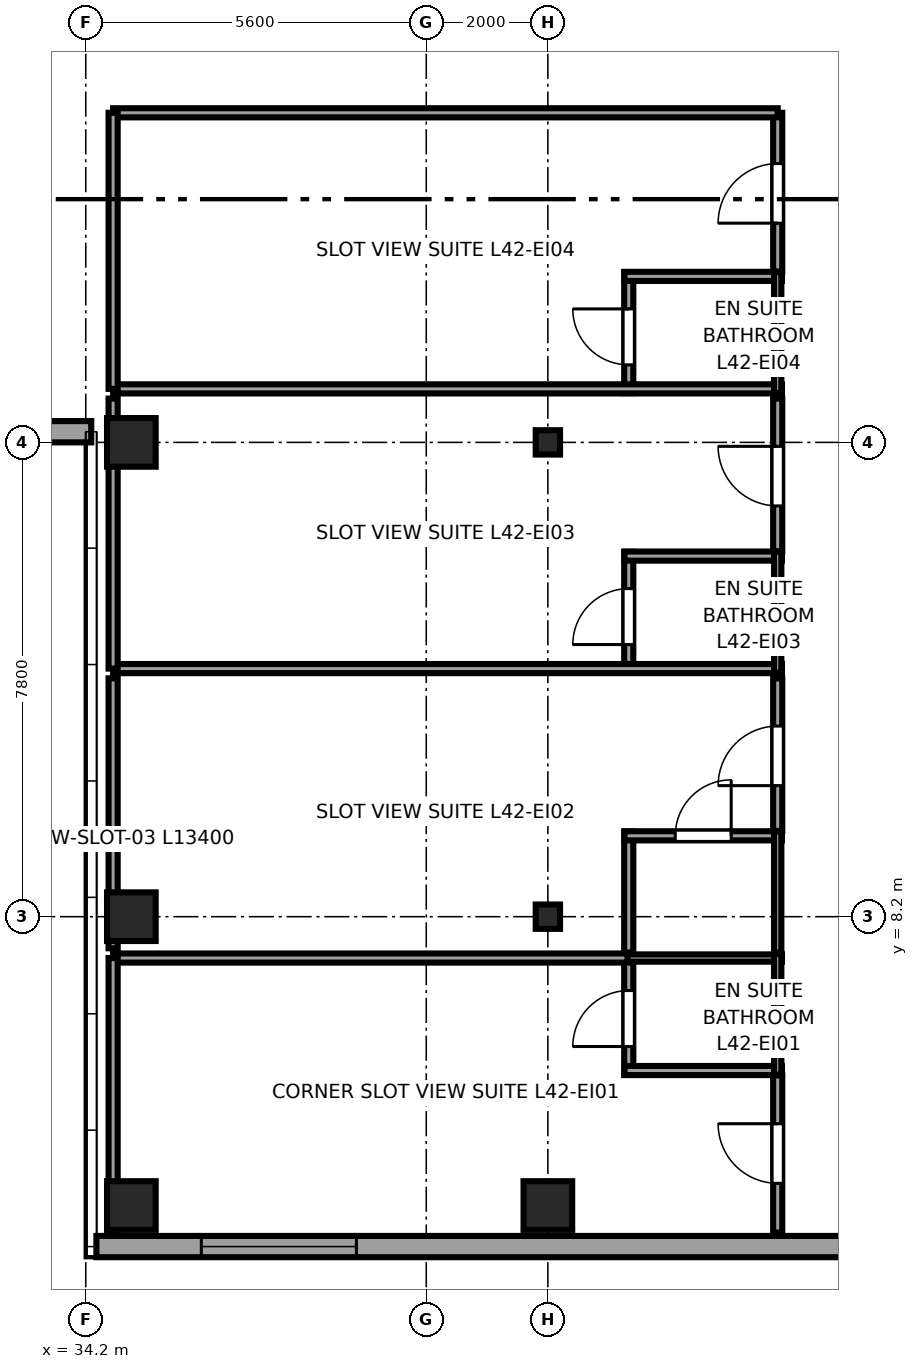
"""IFC4 building model, lengths in metres.
Left out: names, types, materials, properties, quantities, classifications, styles, units other than length and angle.
Written with IfcOpenShell. Run it as: python <this file> out.ifc"""

import sys

from ifc_helpers import new_model, si_unit, direction, frame, frame_2d, origin, origin_2d, place, context, subcontext, project, spatial, rectangle, i_section, extrude, source, transform, mapped, element, fill, save


model = new_model("IFC4")
c1 = context("Model", 3, precision=1e-05, world=origin(), true_north=direction((0.0, 1.0)))
c2 = subcontext(c1, "Body", "Model", "MODEL_VIEW")
j1 = project(units=[si_unit("LENGTHUNIT", "METRE"), si_unit("PLANEANGLEUNIT", "RADIAN")], contexts=[c1])
p1 = place(None, origin())
s1 = spatial("IfcSite", under=j1, at=p1, CompositionType="ELEMENT")
p2 = place(p1, origin())
s2 = spatial("IfcBuilding", under=s1, at=p2, CompositionType="ELEMENT")
p3 = place(p2, frame((0.0, 0.0, 161.25)))
s3 = spatial("IfcBuildingStorey", under=s2, at=p3, CompositionType="ELEMENT", Elevation=161.25)
m1 = source(origin(), c2, "Body", "SweptSolid", [
    extrude(rectangle(XDim=0.8, YDim=0.8, at=origin_2d()), origin(), (0.0, 0.0, 1.0), 3.55),
])
for number, where, z_axis, x_axis in (
    (1, (34.95, 3.45, 0.0), (0.0, 0.0, 1.0), (1.0, 0.0, 0.0)),
    (2, (34.95, 8.2, 0.0), (0.0, 0.0, 1.0), (1.0, 0.0, 0.0)),
    (3, (34.95, 16.0, 0.0), (0.0, 0.0, 1.0), (1.0, 0.0, 0.0)),
    (4, (41.8, 3.45, 0.0), (0.0, 0.0, 1.0), (1.0, 0.0, 0.0)),
):
    element("IfcColumn", number, at=place(p3, frame(where, z_axis=z_axis, x_axis=x_axis)), inside=s3, PredefinedType="COLUMN", context=c2, shape_type="MappedRepresentation", body=[
        mapped(m1, transform((0.0, 0.0, 0.0), x_axis=(1.0, 0.0, 0.0), y_axis=(0.0, 1.0, 0.0), z_axis=(0.0, 0.0, 1.0), scale=1.0)),
    ])
m2 = source(origin(), c2, "Body", "SweptSolid", [
    extrude(i_section(OverallWidth=0.4, OverallDepth=0.4, WebThickness=0.02, FlangeThickness=0.035, at=origin_2d()), origin(), (0.0, 0.0, 1.0), 3.55),
])
for number, where, z_axis, x_axis in (
    (5, (41.8, 8.2, 0.0), (0.0, 0.0, 1.0), (1.0, 0.0, 0.0)),
    (6, (41.8, 16.0, 0.0), (0.0, 0.0, 1.0), (1.0, 0.0, 0.0)),
):
    element("IfcColumn", number, at=place(p3, frame(where, z_axis=z_axis, x_axis=x_axis)), inside=s3, PredefinedType="COLUMN", context=c2, shape_type="MappedRepresentation", body=[
        mapped(m2, transform((0.0, 0.0, 0.0), x_axis=(1.0, 0.0, 0.0), y_axis=(0.0, 1.0, 0.0), z_axis=(0.0, 0.0, 1.0), scale=1.0)),
    ])
p4 = place(p3, frame((22.71, 16.175, 0.0), z_axis=(0.0, 0.0, 1.0), x_axis=(1.0, 0.0, 0.0)))
e7 = element("IfcWall", 7, at=p4, inside=s3, PredefinedType="SOLIDWALL", context=c2, shape_type="SweptSolid", body=[
    extrude(rectangle(XDim=11.58, YDim=0.35, at=frame_2d((5.79, 0.0))), origin(), (0.0, 0.0, 1.0), 2.758),
])
p5 = place(p4, frame((1.92, 0.0, 0.68)))
e8 = element("IfcOpeningElement", 8, at=p5, cuts=e7, PredefinedType="OPENING", context=c2, shape_type="SweptSolid", body=[
    extrude(rectangle(XDim=2.55, YDim=1.92, at=frame_2d((1.275, 0.96))), frame((0.0, 0.185, 0.0), z_axis=(0.0, -1.0, 0.0), x_axis=(1.0, 0.0, 0.0)), (0.0, 0.0, 1.0), 0.37),
])
p6 = place(p4, frame((7.11, 0.0, 0.68)))
e9 = element("IfcOpeningElement", 9, at=p6, cuts=e7, PredefinedType="OPENING", context=c2, shape_type="SweptSolid", body=[
    extrude(rectangle(XDim=2.55, YDim=1.92, at=frame_2d((1.275, 0.96))), frame((0.0, 0.185, 0.0), z_axis=(0.0, -1.0, 0.0), x_axis=(1.0, 0.0, 0.0)), (0.0, 0.0, 1.0), 0.37),
])
p7 = place(p3, frame((34.375, 2.775, 0.0), z_axis=(0.0, 0.0, 1.0), x_axis=(1.0, 0.0, 0.0)))
e10 = element("IfcWall", 10, at=p7, inside=s3, PredefinedType="SOLIDWALL", context=c2, shape_type="SweptSolid", body=[
    extrude(rectangle(XDim=15.608, YDim=0.35, at=frame_2d((7.804, 0.0))), origin(), (0.0, 0.0, 1.0), 3.37),
])
p8 = place(p7, frame((1.726, 0.0, 0.68)))
e11 = element("IfcOpeningElement", 11, at=p8, cuts=e10, PredefinedType="OPENING", context=c2, shape_type="SweptSolid", body=[
    extrude(rectangle(XDim=2.55, YDim=1.92, at=frame_2d((1.275, 0.96))), frame((0.0, 0.185, 0.0), z_axis=(0.0, -1.0, 0.0), x_axis=(1.0, 0.0, 0.0)), (0.0, 0.0, 1.0), 0.37),
])
p9 = place(p7, frame((13.616, 0.0, 0.62)))
e12 = element("IfcOpeningElement", 12, at=p9, cuts=e10, PredefinedType="OPENING", context=c2, shape_type="SweptSolid", body=[
    extrude(rectangle(XDim=1.5, YDim=1.55, at=frame_2d((0.75, 0.775))), frame((0.0, 0.185, 0.0), z_axis=(0.0, -1.0, 0.0), x_axis=(1.0, 0.0, 0.0)), (0.0, 0.0, 1.0), 0.37),
])
p10 = place(p3, frame((43.13, 5.6, 0.0), z_axis=(0.0, 0.0, 1.0), x_axis=(0.0, 1.0, 0.0)))
e13 = element("IfcWall", 13, at=p10, inside=s3, PredefinedType="PARTITIONING", context=c2, shape_type="SweptSolid", body=[
    extrude(rectangle(XDim=1.99, YDim=0.15, at=frame_2d((0.995, 0.0))), origin(), (0.0, 0.0, 1.0), 3.37),
])
p11 = place(p10, frame((0.465, 0.0, 0.0)))
e14 = element("IfcOpeningElement", 14, at=p11, cuts=e13, PredefinedType="OPENING", context=c2, shape_type="SweptSolid", body=[
    extrude(rectangle(XDim=0.92, YDim=2.01, at=frame_2d((0.46, 1.005))), frame((0.0, 0.085, 0.0), z_axis=(0.0, -1.0, 0.0), x_axis=(1.0, 0.0, 0.0)), (0.0, 0.0, 1.0), 0.17),
])
p12 = place(p3, frame((43.06, 5.67, 0.0), z_axis=(0.0, 0.0, 1.0), x_axis=(1.0, 0.0, 0.0)))
e15 = element("IfcWall", 15, at=p12, inside=s3, PredefinedType="PARTITIONING", context=c2, shape_type="SweptSolid", body=[
    extrude(rectangle(XDim=2.59, YDim=0.15, at=frame_2d((1.295, 0.0))), origin(), (0.0, 0.0, 1.0), 3.37),
])
p13 = place(p3, frame((43.06, 7.52, 0.0), z_axis=(0.0, 0.0, 1.0), x_axis=(1.0, 0.0, 0.0)))
e16 = element("IfcWall", 16, at=p13, inside=s3, PredefinedType="PLUMBINGWALL", context=c2, shape_type="SweptSolid", body=[
    extrude(rectangle(XDim=2.59, YDim=0.12, at=frame_2d((1.295, 0.0))), origin(), (0.0, 0.0, 1.0), 3.37),
])
p14 = place(p3, frame((45.58, 5.6, 0.0), z_axis=(0.0, 0.0, 1.0), x_axis=(0.0, 1.0, 0.0)))
e17 = element("IfcWall", 17, at=p14, inside=s3, PredefinedType="PLUMBINGWALL", context=c2, shape_type="SweptSolid", body=[
    extrude(rectangle(XDim=1.99, YDim=0.12, at=frame_2d((0.995, 0.0))), origin(), (0.0, 0.0, 1.0), 3.37),
])
p15 = place(p3, frame((43.13, 7.61, 0.0), z_axis=(0.0, 0.0, 1.0), x_axis=(0.0, 1.0, 0.0)))
e18 = element("IfcWall", 18, at=p15, inside=s3, PredefinedType="PARTITIONING", context=c2, shape_type="SweptSolid", body=[
    extrude(rectangle(XDim=1.99, YDim=0.15, at=frame_2d((0.995, 0.0))), origin(), (0.0, 0.0, 1.0), 3.37),
])
p16 = place(p3, frame((43.06, 9.53, 0.0), z_axis=(0.0, 0.0, 1.0), x_axis=(1.0, 0.0, 0.0)))
e19 = element("IfcWall", 19, at=p16, inside=s3, PredefinedType="PARTITIONING", context=c2, shape_type="SweptSolid", body=[
    extrude(rectangle(XDim=2.59, YDim=0.15, at=frame_2d((1.295, 0.0))), origin(), (0.0, 0.0, 1.0), 3.37),
])
p17 = place(p16, frame((0.835, 0.0, 0.0)))
e20 = element("IfcOpeningElement", 20, at=p17, cuts=e19, PredefinedType="OPENING", context=c2, shape_type="SweptSolid", body=[
    extrude(rectangle(XDim=0.92, YDim=2.01, at=frame_2d((0.46, 1.005))), frame((0.0, 0.085, 0.0), z_axis=(0.0, -1.0, 0.0), x_axis=(1.0, 0.0, 0.0)), (0.0, 0.0, 1.0), 0.17),
])
p18 = place(p3, frame((45.58, 7.61, 0.0), z_axis=(0.0, 0.0, 1.0), x_axis=(0.0, 1.0, 0.0)))
e21 = element("IfcWall", 21, at=p18, inside=s3, PredefinedType="PLUMBINGWALL", context=c2, shape_type="SweptSolid", body=[
    extrude(rectangle(XDim=1.99, YDim=0.12, at=frame_2d((0.995, 0.0))), origin(), (0.0, 0.0, 1.0), 3.001),
])
p19 = place(p3, frame((43.13, 12.21, 0.0), z_axis=(0.0, 0.0, 1.0), x_axis=(0.0, 1.0, 0.0)))
e22 = element("IfcWall", 22, at=p19, inside=s3, PredefinedType="PARTITIONING", context=c2, shape_type="SweptSolid", body=[
    extrude(rectangle(XDim=1.99, YDim=0.15, at=frame_2d((0.995, 0.0))), origin(), (0.0, 0.0, 1.0), 3.37),
])
p20 = place(p19, frame((0.465, 0.0, 0.0)))
e23 = element("IfcOpeningElement", 23, at=p20, cuts=e22, PredefinedType="OPENING", context=c2, shape_type="SweptSolid", body=[
    extrude(rectangle(XDim=0.92, YDim=2.01, at=frame_2d((0.46, 1.005))), frame((0.0, 0.085, 0.0), z_axis=(0.0, -1.0, 0.0), x_axis=(1.0, 0.0, 0.0)), (0.0, 0.0, 1.0), 0.17),
])
p21 = place(p3, frame((34.65, 12.28, 0.0), z_axis=(0.0, 0.0, 1.0), x_axis=(1.0, 0.0, 0.0)))
e24 = element("IfcWall", 24, at=p21, inside=s3, PredefinedType="PARTITIONING", context=c2, shape_type="SweptSolid", body=[
    extrude(rectangle(XDim=11.0, YDim=0.15, at=frame_2d((5.5, 0.0))), origin(), (0.0, 0.0, 1.0), 3.37),
])
p22 = place(p3, frame((43.06, 14.13, 0.0), z_axis=(0.0, 0.0, 1.0), x_axis=(1.0, 0.0, 0.0)))
e25 = element("IfcWall", 25, at=p22, inside=s3, PredefinedType="PARTITIONING", context=c2, shape_type="SweptSolid", body=[
    extrude(rectangle(XDim=2.59, YDim=0.15, at=frame_2d((1.295, 0.0))), origin(), (0.0, 0.0, 1.0), 3.37),
])
p23 = place(p3, frame((45.58, 12.21, 0.0), z_axis=(0.0, 0.0, 1.0), x_axis=(0.0, 1.0, 0.0)))
e26 = element("IfcWall", 26, at=p23, inside=s3, PredefinedType="PLUMBINGWALL", context=c2, shape_type="SweptSolid", body=[
    extrude(rectangle(XDim=1.99, YDim=0.12, at=frame_2d((0.995, 0.0))), origin(), (0.0, 0.0, 1.0), 3.001),
])
p24 = place(p3, frame((43.13, 16.81, 0.0), z_axis=(0.0, 0.0, 1.0), x_axis=(0.0, 1.0, 0.0)))
e27 = element("IfcWall", 27, at=p24, inside=s3, PredefinedType="PARTITIONING", context=c2, shape_type="SweptSolid", body=[
    extrude(rectangle(XDim=1.99, YDim=0.15, at=frame_2d((0.995, 0.0))), origin(), (0.0, 0.0, 1.0), 3.37),
])
p25 = place(p24, frame((0.465, 0.0, 0.0)))
e28 = element("IfcOpeningElement", 28, at=p25, cuts=e27, PredefinedType="OPENING", context=c2, shape_type="SweptSolid", body=[
    extrude(rectangle(XDim=0.92, YDim=2.01, at=frame_2d((0.46, 1.005))), frame((0.0, 0.085, 0.0), z_axis=(0.0, -1.0, 0.0), x_axis=(1.0, 0.0, 0.0)), (0.0, 0.0, 1.0), 0.17),
])
p26 = place(p3, frame((34.65, 16.88, 0.0), z_axis=(0.0, 0.0, 1.0), x_axis=(1.0, 0.0, 0.0)))
e29 = element("IfcWall", 29, at=p26, inside=s3, PredefinedType="PARTITIONING", context=c2, shape_type="SweptSolid", body=[
    extrude(rectangle(XDim=11.0, YDim=0.15, at=frame_2d((5.5, 0.0))), origin(), (0.0, 0.0, 1.0), 3.37),
])
p27 = place(p3, frame((43.06, 18.73, 0.0), z_axis=(0.0, 0.0, 1.0), x_axis=(1.0, 0.0, 0.0)))
e30 = element("IfcWall", 30, at=p27, inside=s3, PredefinedType="PARTITIONING", context=c2, shape_type="SweptSolid", body=[
    extrude(rectangle(XDim=2.59, YDim=0.15, at=frame_2d((1.295, 0.0))), origin(), (0.0, 0.0, 1.0), 3.37),
])
p28 = place(p3, frame((45.58, 16.81, 0.0), z_axis=(0.0, 0.0, 1.0), x_axis=(0.0, 1.0, 0.0)))
e31 = element("IfcWall", 31, at=p28, inside=s3, PredefinedType="PLUMBINGWALL", context=c2, shape_type="SweptSolid", body=[
    extrude(rectangle(XDim=1.99, YDim=0.12, at=frame_2d((0.995, 0.0))), origin(), (0.0, 0.0, 1.0), 3.001),
])
p29 = place(p3, frame((45.58, 3.005, 0.0), z_axis=(0.0, 0.0, 1.0), x_axis=(0.0, 1.0, 0.0)))
e32 = element("IfcWall", 32, at=p29, inside=s3, PredefinedType="PARTITIONING", context=c2, shape_type="SweptSolid", body=[
    extrude(rectangle(XDim=2.585, YDim=0.15, at=frame_2d((1.292, 0.0))), origin(), (0.0, 0.0, 1.0), 3.37),
])
p30 = place(p29, frame((0.81, 0.0, 0.0)))
e33 = element("IfcOpeningElement", 33, at=p30, cuts=e32, PredefinedType="OPENING", context=c2, shape_type="SweptSolid", body=[
    extrude(rectangle(XDim=0.98, YDim=2.12, at=frame_2d((0.49, 1.06))), frame((0.0, 0.085, 0.0), z_axis=(0.0, -1.0, 0.0), x_axis=(1.0, 0.0, 0.0)), (0.0, 0.0, 1.0), 0.17),
])
p31 = place(p3, frame((34.65, 7.52, 0.0), z_axis=(0.0, 0.0, 1.0), x_axis=(1.0, 0.0, 0.0)))
e34 = element("IfcWall", 34, at=p31, inside=s3, PredefinedType="PARTITIONING", context=c2, shape_type="SweptSolid", body=[
    extrude(rectangle(XDim=8.46, YDim=0.15, at=frame_2d((4.23, 0.0))), origin(), (0.0, 0.0, 1.0), 3.37),
])
p32 = place(p3, frame((34.65, 3.005, 0.0), z_axis=(0.0, 0.0, 1.0), x_axis=(0.0, 1.0, 0.0)))
e35 = element("IfcWall", 35, at=p32, inside=s3, PredefinedType="PARTITIONING", context=c2, shape_type="SweptSolid", body=[
    extrude(rectangle(XDim=4.515, YDim=0.15, at=frame_2d((2.258, 0.0))), origin(), (0.0, 0.0, 1.0), 3.37),
])
p33 = place(p3, frame((45.58, 9.61, 0.0), z_axis=(0.0, 0.0, 1.0), x_axis=(0.0, 1.0, 0.0)))
e36 = element("IfcWall", 36, at=p33, inside=s3, PredefinedType="PARTITIONING", context=c2, shape_type="SweptSolid", body=[
    extrude(rectangle(XDim=2.51, YDim=0.15, at=frame_2d((1.255, 0.0))), origin(), (0.0, 0.0, 1.0), 3.001),
])
p34 = place(p33, frame((0.745, 0.0, 0.0)))
e37 = element("IfcOpeningElement", 37, at=p34, cuts=e36, PredefinedType="OPENING", context=c2, shape_type="SweptSolid", body=[
    extrude(rectangle(XDim=0.98, YDim=2.12, at=frame_2d((0.49, 1.06))), frame((0.0, 0.085, 0.0), z_axis=(0.0, -1.0, 0.0), x_axis=(1.0, 0.0, 0.0)), (0.0, 0.0, 1.0), 0.17),
])
p35 = place(p3, frame((34.65, 7.68, 0.0), z_axis=(0.0, 0.0, 1.0), x_axis=(0.0, 1.0, 0.0)))
e38 = element("IfcWall", 38, at=p35, inside=s3, PredefinedType="PARTITIONING", context=c2, shape_type="SweptSolid", body=[
    extrude(rectangle(XDim=4.44, YDim=0.15, at=frame_2d((2.22, 0.0))), origin(), (0.0, 0.0, 1.0), 3.37),
])
p36 = place(p3, frame((45.58, 14.21, 0.0), z_axis=(0.0, 0.0, 1.0), x_axis=(0.0, 1.0, 0.0)))
e39 = element("IfcWall", 39, at=p36, inside=s3, PredefinedType="PARTITIONING", context=c2, shape_type="SweptSolid", body=[
    extrude(rectangle(XDim=2.51, YDim=0.15, at=frame_2d((1.255, 0.0))), origin(), (0.0, 0.0, 1.0), 3.001),
])
p37 = place(p36, frame((0.745, 0.0, 0.0)))
e40 = element("IfcOpeningElement", 40, at=p37, cuts=e39, PredefinedType="OPENING", context=c2, shape_type="SweptSolid", body=[
    extrude(rectangle(XDim=0.98, YDim=2.12, at=frame_2d((0.49, 1.06))), frame((0.0, 0.085, 0.0), z_axis=(0.0, -1.0, 0.0), x_axis=(1.0, 0.0, 0.0)), (0.0, 0.0, 1.0), 0.17),
])
p38 = place(p3, frame((34.65, 12.28, 0.0), z_axis=(0.0, 0.0, 1.0), x_axis=(0.0, 1.0, 0.0)))
e41 = element("IfcWall", 41, at=p38, inside=s3, PredefinedType="PARTITIONING", context=c2, shape_type="SweptSolid", body=[
    extrude(rectangle(XDim=4.44, YDim=0.15, at=frame_2d((2.22, 0.0))), origin(), (0.0, 0.0, 1.0), 3.37),
])
p39 = place(p3, frame((45.58, 18.81, 0.0), z_axis=(0.0, 0.0, 1.0), x_axis=(0.0, 1.0, 0.0)))
e42 = element("IfcWall", 42, at=p39, inside=s3, PredefinedType="PARTITIONING", context=c2, shape_type="SweptSolid", body=[
    extrude(rectangle(XDim=2.61, YDim=0.15, at=frame_2d((1.305, 0.0))), origin(), (0.0, 0.0, 1.0), 3.001),
])
p40 = place(p39, frame((0.795, 0.0, 0.0)))
e43 = element("IfcOpeningElement", 43, at=p40, cuts=e42, PredefinedType="OPENING", context=c2, shape_type="SweptSolid", body=[
    extrude(rectangle(XDim=0.98, YDim=2.12, at=frame_2d((0.49, 1.06))), frame((0.0, 0.085, 0.0), z_axis=(0.0, -1.0, 0.0), x_axis=(1.0, 0.0, 0.0)), (0.0, 0.0, 1.0), 0.17),
])
p41 = place(p3, frame((34.65, 21.42, 0.0), z_axis=(0.0, 0.0, 1.0), x_axis=(1.0, 0.0, 0.0)))
e44 = element("IfcWall", 44, at=p41, inside=s3, PredefinedType="PARTITIONING", context=c2, shape_type="SweptSolid", body=[
    extrude(rectangle(XDim=10.93, YDim=0.15, at=frame_2d((5.465, 0.0))), origin(), (0.0, 0.0, 1.0), 3.37),
])
p42 = place(p3, frame((34.65, 16.88, 0.0), z_axis=(0.0, 0.0, 1.0), x_axis=(0.0, 1.0, 0.0)))
e45 = element("IfcWall", 45, at=p42, inside=s3, PredefinedType="PARTITIONING", context=c2, shape_type="SweptSolid", body=[
    extrude(rectangle(XDim=4.54, YDim=0.15, at=frame_2d((2.27, 0.0))), origin(), (0.0, 0.0, 1.0), 3.37),
])
m3 = source(origin(), c2, "Body", "SweptSolid", [
    extrude(rectangle(XDim=2.55, YDim=1.92, at=frame_2d((1.275, 0.96))), frame((0.0, 0.09, 0.0), z_axis=(0.0, -1.0, 0.0), x_axis=(1.0, 0.0, 0.0)), (0.0, 0.0, 1.0), 0.06),
])
p43 = place(p8, origin())
e46 = element("IfcWindow", 46, at=p43, inside=s3, PartitioningType="TRIPLE_PANEL_HORIZONTAL", PredefinedType="WINDOW", context=c2, shape_type="MappedRepresentation", body=[
    mapped(m3, transform((0.0, 0.0, 0.0), x_axis=(1.0, 0.0, 0.0), y_axis=(0.0, 1.0, 0.0), z_axis=(0.0, 0.0, 1.0), scale=1.0)),
])
fill(e11, e46)
m4 = source(origin(), c2, "Body", "SweptSolid", [
    extrude(rectangle(XDim=0.92, YDim=2.01, at=frame_2d((0.46, 1.005))), frame((0.0, 0.025, 0.0), z_axis=(0.0, -1.0, 0.0), x_axis=(1.0, 0.0, 0.0)), (0.0, 0.0, 1.0), 0.05),
])
p44 = place(p11, origin())
e47 = element("IfcDoor", 47, at=p44, inside=s3, OperationType="SINGLE_SWING_LEFT", PredefinedType="DOOR", context=c2, shape_type="MappedRepresentation", body=[
    mapped(m4, transform((0.0, 0.0, 0.0), x_axis=(1.0, 0.0, 0.0), y_axis=(0.0, 1.0, 0.0), z_axis=(0.0, 0.0, 1.0), scale=1.0)),
])
fill(e14, e47)
p45 = place(p17, origin())
e48 = element("IfcDoor", 48, at=p45, inside=s3, OperationType="SINGLE_SWING_RIGHT", PredefinedType="DOOR", context=c2, shape_type="MappedRepresentation", body=[
    mapped(m4, transform((0.0, 0.0, 0.0), x_axis=(1.0, 0.0, 0.0), y_axis=(0.0, 1.0, 0.0), z_axis=(0.0, 0.0, 1.0), scale=1.0)),
])
fill(e20, e48)
p46 = place(p20, origin())
e49 = element("IfcDoor", 49, at=p46, inside=s3, OperationType="SINGLE_SWING_LEFT", PredefinedType="DOOR", context=c2, shape_type="MappedRepresentation", body=[
    mapped(m4, transform((0.0, 0.0, 0.0), x_axis=(1.0, 0.0, 0.0), y_axis=(0.0, 1.0, 0.0), z_axis=(0.0, 0.0, 1.0), scale=1.0)),
])
fill(e23, e49)
p47 = place(p25, origin())
e50 = element("IfcDoor", 50, at=p47, inside=s3, OperationType="SINGLE_SWING_RIGHT", PredefinedType="DOOR", context=c2, shape_type="MappedRepresentation", body=[
    mapped(m4, transform((0.0, 0.0, 0.0), x_axis=(1.0, 0.0, 0.0), y_axis=(0.0, 1.0, 0.0), z_axis=(0.0, 0.0, 1.0), scale=1.0)),
])
fill(e28, e50)
m5 = source(origin(), c2, "Body", "SweptSolid", [
    extrude(rectangle(XDim=0.98, YDim=2.12, at=frame_2d((0.49, 1.06))), frame((0.0, 0.025, 0.0), z_axis=(0.0, -1.0, 0.0), x_axis=(1.0, 0.0, 0.0)), (0.0, 0.0, 1.0), 0.05),
])
p48 = place(p30, origin())
e51 = element("IfcDoor", 51, at=p48, inside=s3, OperationType="SINGLE_SWING_RIGHT", PredefinedType="DOOR", context=c2, shape_type="MappedRepresentation", body=[
    mapped(m5, transform((0.0, 0.0, 0.0), x_axis=(1.0, 0.0, 0.0), y_axis=(0.0, 1.0, 0.0), z_axis=(0.0, 0.0, 1.0), scale=1.0)),
])
fill(e33, e51)
p49 = place(p34, origin())
e52 = element("IfcDoor", 52, at=p49, inside=s3, OperationType="SINGLE_SWING_LEFT", PredefinedType="DOOR", context=c2, shape_type="MappedRepresentation", body=[
    mapped(m5, transform((0.0, 0.0, 0.0), x_axis=(1.0, 0.0, 0.0), y_axis=(0.0, 1.0, 0.0), z_axis=(0.0, 0.0, 1.0), scale=1.0)),
])
fill(e37, e52)
p50 = place(p37, origin())
e53 = element("IfcDoor", 53, at=p50, inside=s3, OperationType="SINGLE_SWING_RIGHT", PredefinedType="DOOR", context=c2, shape_type="MappedRepresentation", body=[
    mapped(m5, transform((0.0, 0.0, 0.0), x_axis=(1.0, 0.0, 0.0), y_axis=(0.0, 1.0, 0.0), z_axis=(0.0, 0.0, 1.0), scale=1.0)),
])
fill(e40, e53)
p51 = place(p40, origin())
e54 = element("IfcDoor", 54, at=p51, inside=s3, OperationType="SINGLE_SWING_LEFT", PredefinedType="DOOR", context=c2, shape_type="MappedRepresentation", body=[
    mapped(m5, transform((0.0, 0.0, 0.0), x_axis=(1.0, 0.0, 0.0), y_axis=(0.0, 1.0, 0.0), z_axis=(0.0, 0.0, 1.0), scale=1.0)),
])
fill(e43, e54)
save(model, sys.argv[1])
